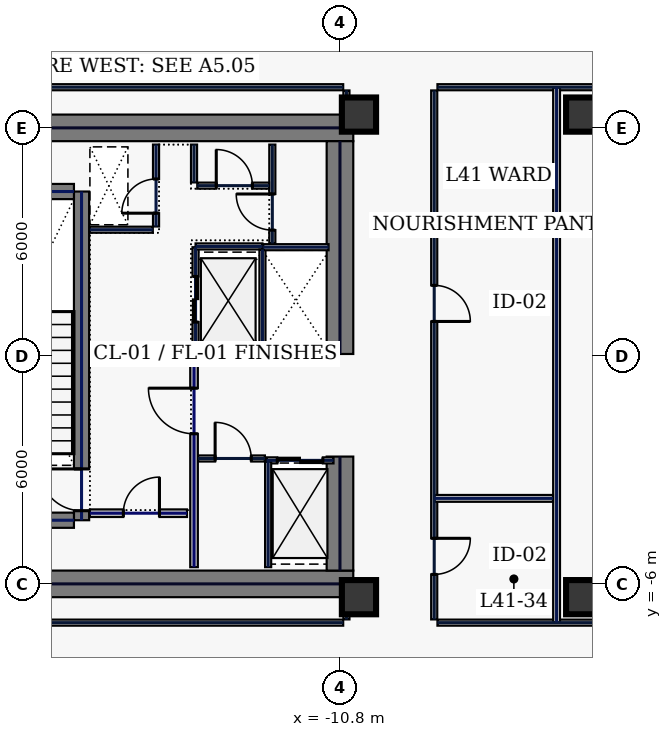
"""IFC4 building model, lengths in metres.
Left out: names, types, materials, properties, quantities, classifications, styles, units other than length and angle.
Written with IfcOpenShell. Run it as: python <this file> out.ifc"""

import sys

from ifc_helpers import new_model, si_unit, direction, frame, frame_2d, origin, origin_2d, place, context, subcontext, project, spatial, rectangle, hollow_rectangle, extrude, element, fill, save


model = new_model("IFC4")
c1 = context("Model", 3, precision=1e-05, world=origin(), true_north=direction((0.0, 1.0)))
c2 = subcontext(c1, "Body", "Model", "MODEL_VIEW")
j1 = project(units=[si_unit("LENGTHUNIT", "METRE"), si_unit("PLANEANGLEUNIT", "RADIAN")], contexts=[c1])
p1 = place(None, origin())
s1 = spatial("IfcSite", under=j1, at=p1, CompositionType="ELEMENT")
p2 = place(p1, origin())
s2 = spatial("IfcBuilding", under=s1, at=p2, CompositionType="ELEMENT")
p3 = place(p2, frame((0.0, 0.0, 180.2)))
s3 = spatial("IfcBuildingStorey", under=s2, at=p3, CompositionType="ELEMENT", Elevation=180.2)
for number, where, z_axis, x_axis in (
    (1, (-22.0, 6.0, 0.0), (0.0, 0.0, 1.0), (1.0, 0.0, 0.0)),
    (2, (-22.0, -6.0, 0.0), (0.0, 0.0, 1.0), (1.0, 0.0, 0.0)),
):
    element("IfcWall", number, at=place(p3, frame(where, z_axis=z_axis, x_axis=x_axis)), inside=s3, PredefinedType="SHEAR", context=c2, shape_type="SweptSolid", body=[
        extrude(rectangle(XDim=11.55, YDim=0.7, at=frame_2d((5.775, 0.0))), origin(), (0.0, 0.0, 1.0), 3.74),
    ])
p4 = place(p3, frame((-10.8, -5.65, 0.0), z_axis=(0.0, 0.0, 1.0), x_axis=(0.0, 1.0, 0.0)))
e3 = element("IfcWall", 3, at=p4, inside=s3, PredefinedType="SHEAR", context=c2, shape_type="SweptSolid", body=[
    extrude(rectangle(XDim=3.0, YDim=0.7, at=frame_2d((1.5, 0.0))), origin(), (0.0, 0.0, 1.0), 3.74),
])
p5 = place(p3, frame((-10.8, 0.05, 0.0), z_axis=(0.0, 0.0, 1.0), x_axis=(0.0, 1.0, 0.0)))
e4 = element("IfcWall", 4, at=p5, inside=s3, PredefinedType="SHEAR", context=c2, shape_type="SweptSolid", body=[
    extrude(rectangle(XDim=5.6, YDim=0.7, at=frame_2d((2.8, 0.0))), origin(), (0.0, 0.0, 1.0), 3.74),
])
p6 = place(p3, frame((-17.6, -4.325, 0.0), z_axis=(0.0, 0.0, 1.0), x_axis=(0.0, 1.0, 0.0)))
e5 = element("IfcWall", 5, at=p6, inside=s3, PredefinedType="SHEAR", context=c2, shape_type="SweptSolid", body=[
    extrude(rectangle(XDim=8.65, YDim=0.4, at=frame_2d((4.325, 0.0))), origin(), (0.0, 0.0, 1.0), 3.74),
])
p7 = place(p6, frame((0.25, 0.0, 0.0)))
e6 = element("IfcOpeningElement", 6, at=p7, cuts=e5, PredefinedType="OPENING", context=c2, shape_type="SweptSolid", body=[
    extrude(rectangle(XDim=1.1, YDim=2.2, at=frame_2d((0.55, 1.1))), frame((0.0, 0.21, 0.0), z_axis=(0.0, -1.0, 0.0), x_axis=(1.0, 0.0, 0.0)), (0.0, 0.0, 1.0), 0.42),
])
for number, where, z_axis, x_axis in (
    (7, (-21.2, -4.325, 0.0), (0.0, 0.0, 1.0), (1.0, 0.0, 0.0)),
    (8, (-21.2, 4.325, 0.0), (0.0, 0.0, 1.0), (1.0, 0.0, 0.0)),
):
    element("IfcWall", number, at=place(p3, frame(where, z_axis=z_axis, x_axis=x_axis)), inside=s3, PredefinedType="SHEAR", context=c2, shape_type="SweptSolid", body=[
        extrude(rectangle(XDim=3.4, YDim=0.4, at=frame_2d((1.7, 0.0))), origin(), (0.0, 0.0, 1.0), 3.74),
    ])
for number, where, z_axis, x_axis in (
    (9, (-10.3, -6.35, 0.0), (0.0, 0.0, 1.0), (1.0, 0.0, 0.0)),
    (10, (-10.3, 6.35, 0.0), (0.0, 0.0, 1.0), (1.0, 0.0, 0.0)),
    (11, (-4.4, -6.35, 0.0), (0.0, 0.0, 1.0), (1.0, 0.0, 0.0)),
    (12, (-4.4, 6.35, 0.0), (0.0, 0.0, 1.0), (1.0, 0.0, 0.0)),
):
    element("IfcColumn", number, at=place(p3, frame(where, z_axis=z_axis, x_axis=x_axis)), inside=s3, PredefinedType="COLUMN", context=c2, shape_type="SweptSolid", body=[
        extrude(hollow_rectangle(XDim=0.9, YDim=0.9, WallThickness=0.04, at=origin_2d()), origin(), (0.0, 0.0, 1.0), 3.74),
    ])
p8 = place(p3, frame((-14.6, 0.12, 0.0), z_axis=(0.0, 0.0, 1.0), x_axis=(0.0, 1.0, 0.0)))
e13 = element("IfcWall", 13, at=p8, inside=s3, PredefinedType="PARTITIONING", context=c2, shape_type="SweptSolid", body=[
    extrude(rectangle(XDim=2.74, YDim=0.16, at=frame_2d((1.37, 0.0))), origin(), (0.0, 0.0, 1.0), 3.74),
])
p9 = place(p8, frame((0.77, 0.0, 0.0)))
e14 = element("IfcOpeningElement", 14, at=p9, cuts=e13, PredefinedType="OPENING", context=c2, shape_type="SweptSolid", body=[
    extrude(rectangle(XDim=1.2, YDim=2.2, at=frame_2d((0.6, 1.1))), frame((0.0, 0.09, 0.0), z_axis=(0.0, -1.0, 0.0), x_axis=(1.0, 0.0, 0.0)), (0.0, 0.0, 1.0), 0.18),
])
for number, where, z_axis, x_axis in (
    (15, (-14.6, 0.1, 0.0), (0.0, 0.0, 1.0), (1.0, 0.0, 0.0)),
    (16, (-14.6, 2.88, 0.0), (0.0, 0.0, 1.0), (1.0, 0.0, 0.0)),
):
    element("IfcWall", number, at=place(p3, frame(where, z_axis=z_axis, x_axis=x_axis)), inside=s3, PredefinedType="PARTITIONING", context=c2, shape_type="SweptSolid", body=[
        extrude(rectangle(XDim=1.76, YDim=0.16, at=frame_2d((0.88, 0.0))), origin(), (0.0, 0.0, 1.0), 3.74),
    ])
p10 = place(p3, frame((-12.84, 0.18, 0.0), z_axis=(0.0, 0.0, 1.0), x_axis=(0.0, 1.0, 0.0)))
e17 = element("IfcWall", 17, at=p10, inside=s3, PredefinedType="PARTITIONING", context=c2, shape_type="SweptSolid", body=[
    extrude(rectangle(XDim=2.62, YDim=0.16, at=frame_2d((1.31, 0.0))), origin(), (0.0, 0.0, 1.0), 3.74),
])
p11 = place(p3, frame((-12.73, -2.75, 0.0), z_axis=(0.0, 0.0, 1.0), x_axis=(1.0, 0.0, 0.0)))
e18 = element("IfcWall", 18, at=p11, inside=s3, PredefinedType="PARTITIONING", context=c2, shape_type="SweptSolid", body=[
    extrude(rectangle(XDim=1.76, YDim=0.16, at=frame_2d((0.88, 0.0))), origin(), (0.0, 0.0, 1.0), 3.74),
])
p12 = place(p11, frame((0.28, 0.0, 0.0)))
e19 = element("IfcOpeningElement", 19, at=p12, cuts=e18, PredefinedType="OPENING", context=c2, shape_type="SweptSolid", body=[
    extrude(rectangle(XDim=1.2, YDim=2.2, at=frame_2d((0.6, 1.1))), frame((0.0, 0.09, 0.0), z_axis=(0.0, -1.0, 0.0), x_axis=(1.0, 0.0, 0.0)), (0.0, 0.0, 1.0), 0.18),
])
for number, where, z_axis, x_axis in (
    (20, (-12.82, 0.06, 0.0), (0.0, 0.0, 1.0), (1.0, 0.0, 0.0)),
    (21, (-12.82, 2.86, 0.0), (0.0, 0.0, 1.0), (1.0, 0.0, 0.0)),
):
    element("IfcWall", number, at=place(p3, frame(where, z_axis=z_axis, x_axis=x_axis)), inside=s3, PredefinedType="PARTITIONING", context=c2, shape_type="SweptSolid", body=[
        extrude(rectangle(XDim=1.72, YDim=0.16, at=frame_2d((0.86, 0.0))), origin(), (0.0, 0.0, 1.0), 3.74),
    ])
p13 = place(p3, frame((-15.64, 3.405, 0.0), z_axis=(0.0, 0.0, 1.0), x_axis=(0.0, 1.0, 0.0)))
e22 = element("IfcWall", 22, at=p13, inside=s3, PredefinedType="PARTITIONING", context=c2, shape_type="SweptSolid", body=[
    extrude(rectangle(XDim=2.155, YDim=0.16, at=frame_2d((1.078, 0.0))), origin(), (0.0, 0.0, 1.0), 3.74),
])
p14 = place(p13, frame((0.35, 0.0, 0.0)))
e23 = element("IfcOpeningElement", 23, at=p14, cuts=e22, PredefinedType="OPENING", context=c2, shape_type="SweptSolid", body=[
    extrude(rectangle(XDim=0.9, YDim=2.2, at=frame_2d((0.45, 1.1))), frame((0.0, 0.09, 0.0), z_axis=(0.0, -1.0, 0.0), x_axis=(1.0, 0.0, 0.0)), (0.0, 0.0, 1.0), 0.18),
])
p15 = place(p3, frame((-17.38, 3.32, 0.0), z_axis=(0.0, 0.0, 1.0), x_axis=(1.0, 0.0, 0.0)))
e24 = element("IfcWall", 24, at=p15, inside=s3, PredefinedType="PARTITIONING", context=c2, shape_type="SweptSolid", body=[
    extrude(rectangle(XDim=1.655, YDim=0.16, at=frame_2d((0.827, 0.0))), origin(), (0.0, 0.0, 1.0), 3.74),
])
p16 = place(p3, frame((-17.38, -4.14, 0.0), z_axis=(0.0, 0.0, 1.0), x_axis=(1.0, 0.0, 0.0)))
e25 = element("IfcWall", 25, at=p16, inside=s3, PredefinedType="SOLIDWALL", context=c2, shape_type="SweptSolid", body=[
    extrude(rectangle(XDim=2.555, YDim=0.2, at=frame_2d((1.277, 0.0))), origin(), (0.0, 0.0, 1.0), 3.74),
])
p17 = place(p16, frame((0.88, 0.0, 0.0)))
e26 = element("IfcOpeningElement", 26, at=p17, cuts=e25, PredefinedType="OPENING", context=c2, shape_type="SweptSolid", body=[
    extrude(rectangle(XDim=0.95, YDim=2.2, at=frame_2d((0.475, 1.1))), frame((0.0, 0.11, 0.0), z_axis=(0.0, -1.0, 0.0), x_axis=(1.0, 0.0, 0.0)), (0.0, 0.0, 1.0), 0.22),
])
p18 = place(p3, frame((-14.535, -2.7, 0.0), z_axis=(0.0, 0.0, 1.0), x_axis=(1.0, 0.0, 0.0)))
e27 = element("IfcWall", 27, at=p18, inside=s3, PredefinedType="PARTITIONING", context=c2, shape_type="SweptSolid", body=[
    extrude(rectangle(XDim=1.76, YDim=0.16, at=frame_2d((0.88, 0.0))), origin(), (0.0, 0.0, 1.0), 3.74),
])
p19 = place(p18, frame((0.45, 0.0, 0.0)))
e28 = element("IfcOpeningElement", 28, at=p19, cuts=e27, PredefinedType="OPENING", context=c2, shape_type="SweptSolid", body=[
    extrude(rectangle(XDim=0.95, YDim=2.2, at=frame_2d((0.475, 1.1))), frame((0.0, 0.09, 0.0), z_axis=(0.0, -1.0, 0.0), x_axis=(1.0, 0.0, 0.0)), (0.0, 0.0, 1.0), 0.18),
])
p20 = place(p3, frame((-12.69, -5.56, 0.0), z_axis=(0.0, 0.0, 1.0), x_axis=(0.0, 1.0, 0.0)))
e29 = element("IfcWall", 29, at=p20, inside=s3, PredefinedType="PARTITIONING", context=c2, shape_type="SweptSolid", body=[
    extrude(rectangle(XDim=2.775, YDim=0.16, at=frame_2d((1.388, 0.0))), origin(), (0.0, 0.0, 1.0), 3.74),
])
p21 = place(p3, frame((-12.58, 2.96, 0.0), z_axis=(0.0, 0.0, 1.0), x_axis=(0.0, 1.0, 0.0)))
e30 = element("IfcWall", 30, at=p21, inside=s3, PredefinedType="PARTITIONING", context=c2, shape_type="SweptSolid", body=[
    extrude(rectangle(XDim=2.6, YDim=0.16, at=frame_2d((1.3, 0.0))), origin(), (0.0, 0.0, 1.0), 3.74),
])
p22 = place(p21, frame((0.35, 0.0, 0.0)))
e31 = element("IfcOpeningElement", 31, at=p22, cuts=e30, PredefinedType="OPENING", context=c2, shape_type="SweptSolid", body=[
    extrude(rectangle(XDim=0.95, YDim=2.2, at=frame_2d((0.475, 1.1))), frame((0.0, 0.09, 0.0), z_axis=(0.0, -1.0, 0.0), x_axis=(1.0, 0.0, 0.0)), (0.0, 0.0, 1.0), 0.18),
])
p23 = place(p3, frame((-14.555, 4.48, 0.0), z_axis=(0.0, 0.0, 1.0), x_axis=(1.0, 0.0, 0.0)))
e32 = element("IfcWall", 32, at=p23, inside=s3, PredefinedType="PARTITIONING", context=c2, shape_type="SweptSolid", body=[
    extrude(rectangle(XDim=1.89, YDim=0.16, at=frame_2d((0.945, 0.0))), origin(), (0.0, 0.0, 1.0), 3.74),
])
p24 = place(p23, frame((0.5, 0.0, 0.0)))
e33 = element("IfcOpeningElement", 33, at=p24, cuts=e32, PredefinedType="OPENING", context=c2, shape_type="SweptSolid", body=[
    extrude(rectangle(XDim=0.95, YDim=2.2, at=frame_2d((0.475, 1.1))), frame((0.0, 0.09, 0.0), z_axis=(0.0, -1.0, 0.0), x_axis=(1.0, 0.0, 0.0)), (0.0, 0.0, 1.0), 0.18),
])
p25 = place(p3, frame((-14.64, 4.565, 0.0), z_axis=(0.0, 0.0, 1.0), x_axis=(0.0, 1.0, 0.0)))
e34 = element("IfcWall", 34, at=p25, inside=s3, PredefinedType="PARTITIONING", context=c2, shape_type="SweptSolid", body=[
    extrude(rectangle(XDim=0.995, YDim=0.16, at=frame_2d((0.498, 0.0))), origin(), (0.0, 0.0, 1.0), 3.74),
])
p26 = place(p3, frame((-14.64, -5.56, 0.0), z_axis=(0.0, 0.0, 1.0), x_axis=(0.0, 1.0, 0.0)))
e35 = element("IfcWall", 35, at=p26, inside=s3, PredefinedType="SOLIDWALL", context=c2, shape_type="SweptSolid", body=[
    extrude(rectangle(XDim=5.6, YDim=0.2, at=frame_2d((2.8, 0.0))), origin(), (0.0, 0.0, 1.0), 3.74),
])
p27 = place(p26, frame((3.51, 0.0, 0.0)))
e36 = element("IfcOpeningElement", 36, at=p27, cuts=e35, PredefinedType="OPENING", context=c2, shape_type="SweptSolid", body=[
    extrude(rectangle(XDim=1.2, YDim=2.2, at=frame_2d((0.6, 1.1))), frame((0.0, 0.11, 0.0), z_axis=(0.0, -1.0, 0.0), x_axis=(1.0, 0.0, 0.0)), (0.0, 0.0, 1.0), 0.22),
])
p28 = place(p3, frame((-24.965, -7.02, 0.0), z_axis=(0.0, 0.0, 1.0), x_axis=(1.0, 0.0, 0.0)))
e37 = element("IfcWall", 37, at=p28, inside=s3, PredefinedType="PARTITIONING", context=c2, shape_type="SweptSolid", body=[
    extrude(rectangle(XDim=14.25, YDim=0.16, at=frame_2d((7.125, 0.0))), origin(), (0.0, 0.0, 1.0), 3.74),
])
p29 = place(p3, frame((-10.63, -6.935, 0.0), z_axis=(0.0, 0.0, 1.0), x_axis=(0.0, 1.0, 0.0)))
e38 = element("IfcWall", 38, at=p29, inside=s3, PredefinedType="PARTITIONING", context=c2, shape_type="SweptSolid", body=[
    extrude(rectangle(XDim=0.515, YDim=0.16, at=frame_2d((0.258, 0.0))), origin(), (0.0, 0.0, 1.0), 3.74),
])
p30 = place(p3, frame((-10.63, 6.42, 0.0), z_axis=(0.0, 0.0, 1.0), x_axis=(0.0, 1.0, 0.0)))
e39 = element("IfcWall", 39, at=p30, inside=s3, PredefinedType="PARTITIONING", context=c2, shape_type="SweptSolid", body=[
    extrude(rectangle(XDim=0.565, YDim=0.16, at=frame_2d((0.283, 0.0))), origin(), (0.0, 0.0, 1.0), 3.74),
])
p31 = place(p3, frame((-10.715, 7.07, 0.0), z_axis=(0.0, 0.0, 1.0), x_axis=(-1.0, 0.0, 0.0)))
e40 = element("IfcWall", 40, at=p31, inside=s3, PredefinedType="PARTITIONING", context=c2, shape_type="SweptSolid", body=[
    extrude(rectangle(XDim=14.25, YDim=0.16, at=frame_2d((7.125, 0.0))), origin(), (0.0, 0.0, 1.0), 3.74),
])
p32 = place(p3, frame((-1.415, 7.07, 0.0), z_axis=(0.0, 0.0, 1.0), x_axis=(-1.0, 0.0, 0.0)))
e41 = element("IfcWall", 41, at=p32, inside=s3, PredefinedType="PARTITIONING", context=c2, shape_type="SweptSolid", body=[
    extrude(rectangle(XDim=6.82, YDim=0.16, at=frame_2d((3.41, 0.0))), origin(), (0.0, 0.0, 1.0), 3.74),
])
p33 = place(p3, frame((-8.32, 6.985, 0.0), z_axis=(0.0, 0.0, 1.0), x_axis=(0.0, -1.0, 0.0)))
e42 = element("IfcWall", 42, at=p33, inside=s3, PredefinedType="PARTITIONING", context=c2, shape_type="SweptSolid", body=[
    extrude(rectangle(XDim=13.92, YDim=0.16, at=frame_2d((6.96, 0.0))), origin(), (0.0, 0.0, 1.0), 3.74),
])
p34 = place(p33, frame((11.786, 0.0, 0.0)))
e43 = element("IfcOpeningElement", 43, at=p34, cuts=e42, PredefinedType="OPENING", context=c2, shape_type="SweptSolid", body=[
    extrude(rectangle(XDim=0.95, YDim=2.2, at=frame_2d((0.475, 1.1))), frame((0.0, 0.09, 0.0), z_axis=(0.0, -1.0, 0.0), x_axis=(1.0, 0.0, 0.0)), (0.0, 0.0, 1.0), 0.18),
])
p35 = place(p33, frame((5.129, 0.0, 0.0)))
e44 = element("IfcOpeningElement", 44, at=p35, cuts=e42, PredefinedType="OPENING", context=c2, shape_type="SweptSolid", body=[
    extrude(rectangle(XDim=0.95, YDim=2.2, at=frame_2d((0.475, 1.1))), frame((0.0, 0.09, 0.0), z_axis=(0.0, -1.0, 0.0), x_axis=(1.0, 0.0, 0.0)), (0.0, 0.0, 1.0), 0.18),
])
p36 = place(p3, frame((-8.235, -7.02, 0.0), z_axis=(0.0, 0.0, 1.0), x_axis=(1.0, 0.0, 0.0)))
e45 = element("IfcWall", 45, at=p36, inside=s3, PredefinedType="PARTITIONING", context=c2, shape_type="SweptSolid", body=[
    extrude(rectangle(XDim=6.82, YDim=0.16, at=frame_2d((3.41, 0.0))), origin(), (0.0, 0.0, 1.0), 3.74),
])
p37 = place(p3, frame((-5.1, -7.015, 0.0), z_axis=(0.0, 0.0, 1.0), x_axis=(0.0, 1.0, 0.0)))
e46 = element("IfcWall", 46, at=p37, inside=s3, PredefinedType="PARTITIONING", context=c2, shape_type="SweptSolid", body=[
    extrude(rectangle(XDim=14.08, YDim=0.18, at=frame_2d((7.04, 0.0))), origin(), (0.0, 0.0, 1.0), 3.74),
])
p38 = place(p3, frame((-8.315, -3.75, 0.0), z_axis=(0.0, 0.0, 1.0), x_axis=(1.0, 0.0, 0.0)))
e47 = element("IfcWall", 47, at=p38, inside=s3, PredefinedType="PARTITIONING", context=c2, shape_type="SweptSolid", body=[
    extrude(rectangle(XDim=3.12, YDim=0.18, at=frame_2d((1.56, 0.0))), origin(), (0.0, 0.0, 1.0), 3.74),
])
p39 = place(p7, origin())
e48 = element("IfcDoor", 48, at=p39, inside=s3, OperationType="SINGLE_SWING_RIGHT", PredefinedType="DOOR", context=c2, shape_type="SweptSolid", body=[
    extrude(rectangle(XDim=1.1, YDim=2.2, at=frame_2d((0.55, 1.1))), frame((0.0, 0.025, 0.0), z_axis=(0.0, -1.0, 0.0), x_axis=(1.0, 0.0, 0.0)), (0.0, 0.0, 1.0), 0.05),
])
fill(e6, e48)
p40 = place(p9, origin())
e49 = element("IfcDoor", 49, at=p40, inside=s3, OperationType="SLIDING_TO_LEFT", PredefinedType="DOOR", context=c2, shape_type="SweptSolid", body=[
    extrude(rectangle(XDim=1.2, YDim=2.2, at=frame_2d((0.6, 1.1))), frame((0.0, 0.025, 0.0), z_axis=(0.0, -1.0, 0.0), x_axis=(1.0, 0.0, 0.0)), (0.0, 0.0, 1.0), 0.05),
])
fill(e14, e49)
p41 = place(p12, origin())
e50 = element("IfcDoor", 50, at=p41, inside=s3, OperationType="SLIDING_TO_LEFT", PredefinedType="DOOR", context=c2, shape_type="SweptSolid", body=[
    extrude(rectangle(XDim=1.2, YDim=2.2, at=frame_2d((0.6, 1.1))), frame((0.0, 0.025, 0.0), z_axis=(0.0, -1.0, 0.0), x_axis=(1.0, 0.0, 0.0)), (0.0, 0.0, 1.0), 0.05),
])
fill(e19, e50)
p42 = place(p14, origin())
e51 = element("IfcDoor", 51, at=p42, inside=s3, OperationType="SINGLE_SWING_LEFT", PredefinedType="DOOR", context=c2, shape_type="SweptSolid", body=[
    extrude(rectangle(XDim=0.9, YDim=2.2, at=frame_2d((0.45, 1.1))), frame((0.0, 0.025, 0.0), z_axis=(0.0, -1.0, 0.0), x_axis=(1.0, 0.0, 0.0)), (0.0, 0.0, 1.0), 0.05),
])
fill(e23, e51)
p43 = place(p17, origin())
e52 = element("IfcDoor", 52, at=p43, inside=s3, OperationType="SINGLE_SWING_RIGHT", PredefinedType="DOOR", context=c2, shape_type="SweptSolid", body=[
    extrude(rectangle(XDim=0.95, YDim=2.2, at=frame_2d((0.475, 1.1))), frame((0.0, 0.025, 0.0), z_axis=(0.0, -1.0, 0.0), x_axis=(1.0, 0.0, 0.0)), (0.0, 0.0, 1.0), 0.05),
])
fill(e26, e52)
p44 = place(p19, origin())
e53 = element("IfcDoor", 53, at=p44, inside=s3, OperationType="SINGLE_SWING_LEFT", PredefinedType="DOOR", context=c2, shape_type="SweptSolid", body=[
    extrude(rectangle(XDim=0.95, YDim=2.2, at=frame_2d((0.475, 1.1))), frame((0.0, 0.025, 0.0), z_axis=(0.0, -1.0, 0.0), x_axis=(1.0, 0.0, 0.0)), (0.0, 0.0, 1.0), 0.05),
])
fill(e28, e53)
p45 = place(p22, origin())
e54 = element("IfcDoor", 54, at=p45, inside=s3, OperationType="SINGLE_SWING_RIGHT", PredefinedType="DOOR", context=c2, shape_type="SweptSolid", body=[
    extrude(rectangle(XDim=0.95, YDim=2.2, at=frame_2d((0.475, 1.1))), frame((0.0, 0.025, 0.0), z_axis=(0.0, -1.0, 0.0), x_axis=(1.0, 0.0, 0.0)), (0.0, 0.0, 1.0), 0.05),
])
fill(e31, e54)
p46 = place(p24, origin())
e55 = element("IfcDoor", 55, at=p46, inside=s3, OperationType="SINGLE_SWING_LEFT", PredefinedType="DOOR", context=c2, shape_type="SweptSolid", body=[
    extrude(rectangle(XDim=0.95, YDim=2.2, at=frame_2d((0.475, 1.1))), frame((0.0, 0.025, 0.0), z_axis=(0.0, -1.0, 0.0), x_axis=(1.0, 0.0, 0.0)), (0.0, 0.0, 1.0), 0.05),
])
fill(e33, e55)
p47 = place(p27, origin())
e56 = element("IfcDoor", 56, at=p47, inside=s3, OperationType="SINGLE_SWING_RIGHT", PredefinedType="DOOR", context=c2, shape_type="SweptSolid", body=[
    extrude(rectangle(XDim=1.2, YDim=2.2, at=frame_2d((0.6, 1.1))), frame((0.0, 0.025, 0.0), z_axis=(0.0, -1.0, 0.0), x_axis=(1.0, 0.0, 0.0)), (0.0, 0.0, 1.0), 0.05),
])
fill(e36, e56)
p48 = place(p34, origin())
e57 = element("IfcDoor", 57, at=p48, inside=s3, OperationType="SINGLE_SWING_LEFT", PredefinedType="DOOR", context=c2, shape_type="SweptSolid", body=[
    extrude(rectangle(XDim=0.95, YDim=2.2, at=frame_2d((0.475, 1.1))), frame((0.0, 0.025, 0.0), z_axis=(0.0, -1.0, 0.0), x_axis=(1.0, 0.0, 0.0)), (0.0, 0.0, 1.0), 0.05),
])
fill(e43, e57)
p49 = place(p35, origin())
e58 = element("IfcDoor", 58, at=p49, inside=s3, OperationType="SINGLE_SWING_RIGHT", PredefinedType="DOOR", context=c2, shape_type="SweptSolid", body=[
    extrude(rectangle(XDim=0.95, YDim=2.2, at=frame_2d((0.475, 1.1))), frame((0.0, 0.025, 0.0), z_axis=(0.0, -1.0, 0.0), x_axis=(1.0, 0.0, 0.0)), (0.0, 0.0, 1.0), 0.05),
])
fill(e44, e58)
save(model, sys.argv[1])
